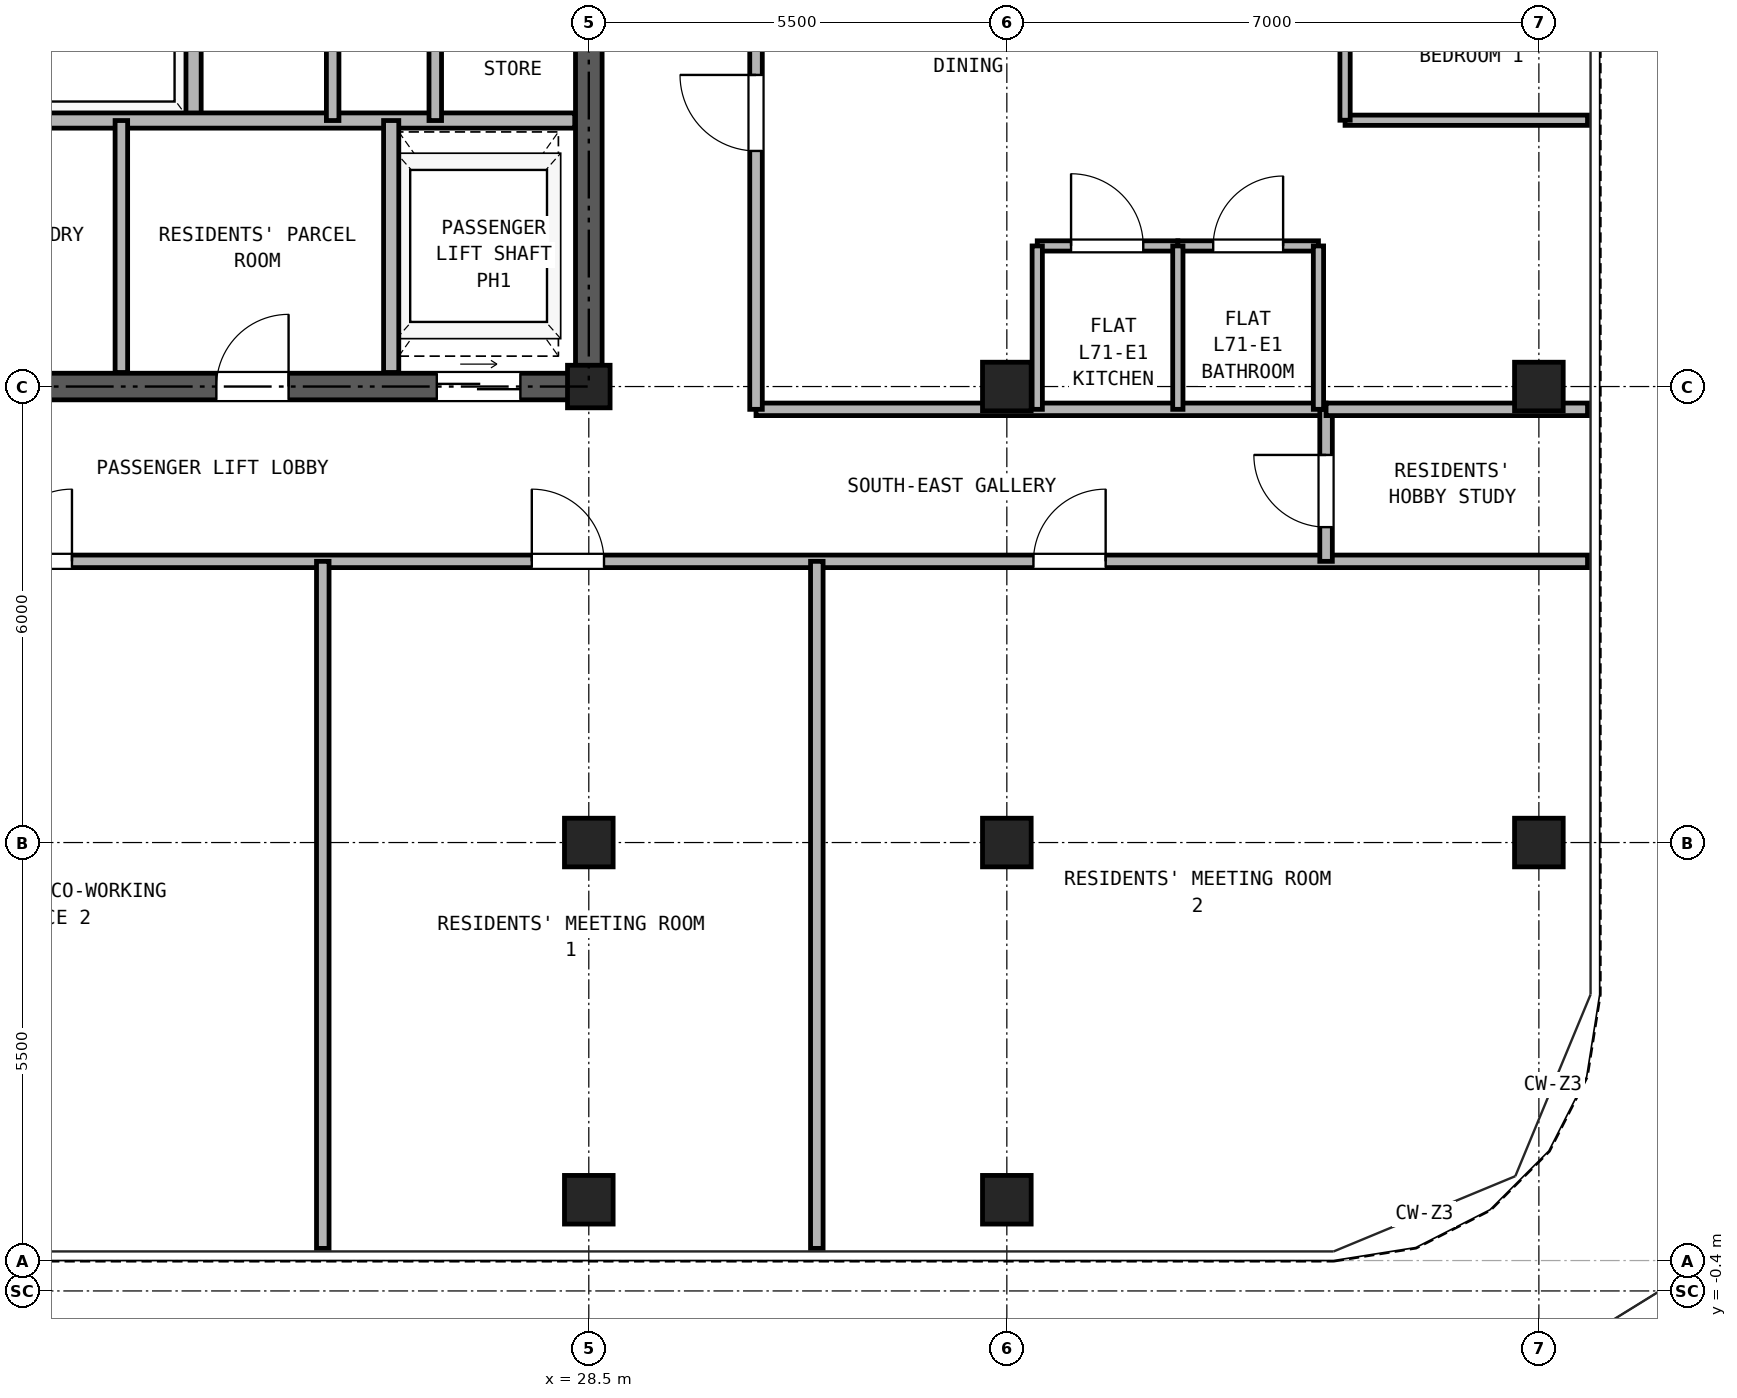
"""IFC4 building model, lengths in metres.
Left out: names, types, materials, properties, quantities, classifications, styles, units other than length and angle.
Written with IfcOpenShell. Run it as: python <this file> out.ifc"""

import sys

from ifc_helpers import new_model, si_unit, direction, frame, frame_2d, origin, origin_2d, place, context, subcontext, project, spatial, rectangle, hollow_rectangle, extrude, source, transform, mapped, element, fill, save


model = new_model("IFC4")
c1 = context("Model", 3, precision=1e-05, world=origin(), true_north=direction((0.0, 1.0)))
c2 = subcontext(c1, "Body", "Model", "MODEL_VIEW")
j1 = project(units=[si_unit("LENGTHUNIT", "METRE"), si_unit("PLANEANGLEUNIT", "RADIAN")], contexts=[c1])
p1 = place(None, origin())
s1 = spatial("IfcSite", under=j1, at=p1, CompositionType="ELEMENT")
p2 = place(p1, origin())
s2 = spatial("IfcBuilding", under=s1, at=p2, CompositionType="ELEMENT")
p3 = place(p2, frame((0.0, 0.0, 248.9)))
s3 = spatial("IfcBuildingStorey", under=s2, at=p3, CompositionType="ELEMENT", Elevation=248.9)
m1 = source(origin(), c2, "Body", "SweptSolid", [
    extrude(hollow_rectangle(XDim=0.64, YDim=0.64, WallThickness=0.035, at=origin_2d()), origin(), (0.0, 0.0, 1.0), 2.98),
])
for number, where, z_axis, x_axis in (
    (1, (28.5, 0.8, 0.0), (0.0, 0.0, 1.0), (1.0, 0.0, 0.0)),
    (2, (34.0, 0.8, 0.0), (0.0, 0.0, 1.0), (1.0, 0.0, 0.0)),
    (3, (41.0, 5.5, 0.0), (0.0, 0.0, 1.0), (1.0, 0.0, 0.0)),
    (4, (41.0, 11.5, 0.0), (0.0, 0.0, 1.0), (1.0, 0.0, 0.0)),
    (5, (28.5, 5.5, 0.0), (0.0, 0.0, 1.0), (1.0, 0.0, 0.0)),
):
    element("IfcColumn", number, at=place(p3, frame(where, z_axis=z_axis, x_axis=x_axis)), inside=s3, PredefinedType="COLUMN", context=c2, shape_type="MappedRepresentation", body=[
        mapped(m1, transform((0.0, 0.0, 0.0), x_axis=(1.0, 0.0, 0.0), y_axis=(0.0, 1.0, 0.0), z_axis=(0.0, 0.0, 1.0), scale=1.0)),
    ])
m2 = source(origin(), c2, "Body", "SweptSolid", [
    extrude(hollow_rectangle(XDim=0.56, YDim=0.56, WallThickness=0.03, at=origin_2d()), origin(), (0.0, 0.0, 1.0), 2.98),
])
p4 = place(p3, frame((28.5, 11.5, 0.0), z_axis=(0.0, 0.0, 1.0), x_axis=(1.0, 0.0, 0.0)))
e6 = element("IfcColumn", 6, at=p4, inside=s3, PredefinedType="COLUMN", context=c2, shape_type="MappedRepresentation", body=[
    mapped(m2, transform((0.0, 0.0, 0.0), x_axis=(1.0, 0.0, 0.0), y_axis=(0.0, 1.0, 0.0), z_axis=(0.0, 0.0, 1.0), scale=1.0)),
])
for number, where, z_axis, x_axis in (
    (7, (34.0, 5.5, 0.0), (0.0, 0.0, 1.0), (1.0, 0.0, 0.0)),
    (8, (34.0, 11.5, 0.0), (0.0, 0.0, 1.0), (1.0, 0.0, 0.0)),
):
    element("IfcColumn", number, at=place(p3, frame(where, z_axis=z_axis, x_axis=x_axis)), inside=s3, PredefinedType="COLUMN", context=c2, shape_type="MappedRepresentation", body=[
        mapped(m1, transform((0.0, 0.0, 0.0), x_axis=(1.0, 0.0, 0.0), y_axis=(0.0, 1.0, 0.0), z_axis=(0.0, 0.0, 1.0), scale=1.0)),
    ])
p5 = place(p3, frame((18.325, 11.5, 0.0), z_axis=(0.0, 0.0, 1.0), x_axis=(1.0, 0.0, 0.0)))
e9 = element("IfcWall", 9, at=p5, inside=s3, PredefinedType="SHEAR", context=c2, shape_type="SweptSolid", body=[
    extrude(rectangle(XDim=10.35, YDim=0.35, at=frame_2d((5.175, 0.0))), origin(), (0.0, 0.0, 1.0), 2.98),
])
p6 = place(p5, frame((1.775, 0.0, 0.0)))
e10 = element("IfcOpeningElement", 10, at=p6, cuts=e9, PredefinedType="OPENING", context=c2, shape_type="SweptSolid", body=[
    extrude(rectangle(XDim=0.95, YDim=2.15, at=frame_2d((0.475, 1.075))), frame((0.0, 0.185, 0.0), z_axis=(0.0, -1.0, 0.0), x_axis=(1.0, 0.0, 0.0)), (0.0, 0.0, 1.0), 0.37),
])
p7 = place(p5, frame((5.275, 0.0, 0.0)))
e11 = element("IfcOpeningElement", 11, at=p7, cuts=e9, PredefinedType="OPENING", context=c2, shape_type="SweptSolid", body=[
    extrude(rectangle(XDim=0.95, YDim=2.15, at=frame_2d((0.475, 1.075))), frame((0.0, 0.185, 0.0), z_axis=(0.0, -1.0, 0.0), x_axis=(1.0, 0.0, 0.0)), (0.0, 0.0, 1.0), 0.37),
])
p8 = place(p5, frame((8.175, 0.0, 0.0)))
e12 = element("IfcOpeningElement", 12, at=p8, cuts=e9, PredefinedType="OPENING", context=c2, shape_type="SweptSolid", body=[
    extrude(rectangle(XDim=1.1, YDim=2.25, at=frame_2d((0.55, 1.125))), frame((0.0, 0.185, 0.0), z_axis=(0.0, -1.0, 0.0), x_axis=(1.0, 0.0, 0.0)), (0.0, 0.0, 1.0), 0.37),
])
p9 = place(p3, frame((28.5, 11.675, 0.0), z_axis=(0.0, 0.0, 1.0), x_axis=(0.0, 1.0, 0.0)))
e13 = element("IfcWall", 13, at=p9, inside=s3, PredefinedType="SHEAR", context=c2, shape_type="SweptSolid", body=[
    extrude(rectangle(XDim=16.9, YDim=0.35, at=frame_2d((8.45, 0.0))), origin(), (0.0, 0.0, 1.0), 2.98),
])
p10 = place(p9, frame((7.475, 0.0, 0.0)))
e14 = element("IfcOpeningElement", 14, at=p10, cuts=e13, PredefinedType="OPENING", context=c2, shape_type="SweptSolid", body=[
    extrude(rectangle(XDim=1.15, YDim=2.2, at=frame_2d((0.575, 1.1))), frame((0.0, 0.185, 0.0), z_axis=(0.0, -1.0, 0.0), x_axis=(1.0, 0.0, 0.0)), (0.0, 0.0, 1.0), 0.37),
])
p11 = place(p3, frame((23.3, 15.0, 0.0), z_axis=(0.0, 0.0, 1.0), x_axis=(0.0, 1.0, 0.0)))
e15 = element("IfcWall", 15, at=p11, inside=s3, PredefinedType="PARTITIONING", context=c2, shape_type="SweptSolid", body=[
    extrude(rectangle(XDim=3.0, YDim=0.2, at=frame_2d((1.5, 0.0))), origin(), (0.0, 0.0, 1.0), 2.98),
])
p12 = place(p3, frame((18.685, 15.0, 0.0), z_axis=(0.0, 0.0, 1.0), x_axis=(1.0, 0.0, 0.0)))
e16 = element("IfcWall", 16, at=p12, inside=s3, PredefinedType="PARTITIONING", context=c2, shape_type="SweptSolid", body=[
    extrude(rectangle(XDim=9.63, YDim=0.2, at=frame_2d((4.815, 0.0))), origin(), (0.0, 0.0, 1.0), 2.98),
])
p13 = place(p3, frame((25.13, 15.0, 0.0), z_axis=(0.0, 0.0, 1.0), x_axis=(0.0, 1.0, 0.0)))
e17 = element("IfcWall", 17, at=p13, inside=s3, PredefinedType="PARTITIONING", context=c2, shape_type="SweptSolid", body=[
    extrude(rectangle(XDim=3.0, YDim=0.165, at=frame_2d((1.5, 0.0))), origin(), (0.0, 0.0, 1.0), 2.98),
])
p14 = place(p3, frame((26.48, 15.0, 0.0), z_axis=(0.0, 0.0, 1.0), x_axis=(0.0, 1.0, 0.0)))
e18 = element("IfcWall", 18, at=p14, inside=s3, PredefinedType="PARTITIONING", context=c2, shape_type="SweptSolid", body=[
    extrude(rectangle(XDim=3.0, YDim=0.165, at=frame_2d((1.5, 0.0))), origin(), (0.0, 0.0, 1.0), 2.98),
])
p15 = place(p14, frame((1.05, 0.0, 0.0)))
e19 = element("IfcOpeningElement", 19, at=p15, cuts=e18, PredefinedType="OPENING", context=c2, shape_type="SweptSolid", body=[
    extrude(rectangle(XDim=0.9, YDim=2.05, at=frame_2d((0.45, 1.025))), frame((0.0, 0.093, 0.0), z_axis=(0.0, -1.0, 0.0), x_axis=(1.0, 0.0, 0.0)), (0.0, 0.0, 1.0), 0.185),
])
p16 = place(p3, frame((22.35, 11.685, 0.0), z_axis=(0.0, 0.0, 1.0), x_axis=(0.0, 1.0, 0.0)))
e20 = element("IfcWall", 20, at=p16, inside=s3, PredefinedType="PARTITIONING", context=c2, shape_type="SweptSolid", body=[
    extrude(rectangle(XDim=3.315, YDim=0.165, at=frame_2d((1.657, 0.0))), origin(), (0.0, 0.0, 1.0), 2.98),
])
p17 = place(p3, frame((25.9, 11.685, 0.0), z_axis=(0.0, 0.0, 1.0), x_axis=(0.0, 1.0, 0.0)))
e21 = element("IfcWall", 21, at=p17, inside=s3, PredefinedType="PARTITIONING", context=c2, shape_type="SweptSolid", body=[
    extrude(rectangle(XDim=3.315, YDim=0.2, at=frame_2d((1.657, 0.0))), origin(), (0.0, 0.0, 1.0), 2.98),
])
p18 = place(p3, frame((5.36, 9.2, 0.0), z_axis=(0.0, 0.0, 1.0), x_axis=(1.0, 0.0, 0.0)))
e22 = element("IfcWall", 22, at=p18, inside=s3, PredefinedType="PARTITIONING", context=c2, shape_type="SweptSolid", body=[
    extrude(rectangle(XDim=36.28, YDim=0.165, at=frame_2d((18.14, 0.0))), origin(), (0.0, 0.0, 1.0), 2.98),
])
p19 = place(p18, frame((7.17, 0.0, 0.0)))
e23 = element("IfcOpeningElement", 23, at=p19, cuts=e22, PredefinedType="OPENING", context=c2, shape_type="SweptSolid", body=[
    extrude(rectangle(XDim=0.95, YDim=2.15, at=frame_2d((0.475, 1.075))), frame((0.0, 0.093, 0.0), z_axis=(0.0, -1.0, 0.0), x_axis=(1.0, 0.0, 0.0)), (0.0, 0.0, 1.0), 0.185),
])
p20 = place(p18, frame((15.39, 0.0, 0.0)))
e24 = element("IfcOpeningElement", 24, at=p20, cuts=e22, PredefinedType="OPENING", context=c2, shape_type="SweptSolid", body=[
    extrude(rectangle(XDim=0.95, YDim=2.15, at=frame_2d((0.475, 1.075))), frame((0.0, 0.093, 0.0), z_axis=(0.0, -1.0, 0.0), x_axis=(1.0, 0.0, 0.0)), (0.0, 0.0, 1.0), 0.185),
])
p21 = place(p18, frame((22.39, 0.0, 0.0)))
e25 = element("IfcOpeningElement", 25, at=p21, cuts=e22, PredefinedType="OPENING", context=c2, shape_type="SweptSolid", body=[
    extrude(rectangle(XDim=0.95, YDim=2.15, at=frame_2d((0.475, 1.075))), frame((0.0, 0.093, 0.0), z_axis=(0.0, -1.0, 0.0), x_axis=(1.0, 0.0, 0.0)), (0.0, 0.0, 1.0), 0.185),
])
p22 = place(p18, frame((28.99, 0.0, 0.0)))
e26 = element("IfcOpeningElement", 26, at=p22, cuts=e22, PredefinedType="OPENING", context=c2, shape_type="SweptSolid", body=[
    extrude(rectangle(XDim=0.95, YDim=2.15, at=frame_2d((0.475, 1.075))), frame((0.0, 0.093, 0.0), z_axis=(0.0, -1.0, 0.0), x_axis=(1.0, 0.0, 0.0)), (0.0, 0.0, 1.0), 0.185),
])
p23 = place(p3, frame((30.7, 11.2, 0.0), z_axis=(0.0, 0.0, 1.0), x_axis=(1.0, 0.0, 0.0)))
e27 = element("IfcWall", 27, at=p23, inside=s3, PredefinedType="PARTITIONING", context=c2, shape_type="SweptSolid", body=[
    extrude(rectangle(XDim=7.5, YDim=0.165, at=frame_2d((3.75, 0.0))), origin(), (0.0, 0.0, 1.0), 2.98),
])
p24 = place(p3, frame((38.2, 9.2, 0.0), z_axis=(0.0, 0.0, 1.0), x_axis=(0.0, 1.0, 0.0)))
e28 = element("IfcWall", 28, at=p24, inside=s3, PredefinedType="PARTITIONING", context=c2, shape_type="SweptSolid", body=[
    extrude(rectangle(XDim=2.0, YDim=0.165, at=frame_2d((1.0, 0.0))), origin(), (0.0, 0.0, 1.0), 2.98),
])
p25 = place(p24, frame((0.45, 0.0, 0.0)))
e29 = element("IfcOpeningElement", 29, at=p25, cuts=e28, PredefinedType="OPENING", context=c2, shape_type="SweptSolid", body=[
    extrude(rectangle(XDim=0.95, YDim=2.15, at=frame_2d((0.475, 1.075))), frame((0.0, 0.093, 0.0), z_axis=(0.0, -1.0, 0.0), x_axis=(1.0, 0.0, 0.0)), (0.0, 0.0, 1.0), 0.185),
])
p26 = place(p3, frame((30.7, 11.2, 0.0), z_axis=(0.0, 0.0, 1.0), x_axis=(0.0, 1.0, 0.0)))
e30 = element("IfcWall", 30, at=p26, inside=s3, PredefinedType="PARTITIONING", context=c2, shape_type="SweptSolid", body=[
    extrude(rectangle(XDim=23.94, YDim=0.165, at=frame_2d((11.97, 0.0))), origin(), (0.0, 0.0, 1.0), 2.98),
])
p27 = place(p26, frame((3.4, 0.0, 0.0)))
e31 = element("IfcOpeningElement", 31, at=p27, cuts=e30, PredefinedType="OPENING", context=c2, shape_type="SweptSolid", body=[
    extrude(rectangle(XDim=1.0, YDim=2.15, at=frame_2d((0.5, 1.075))), frame((0.0, 0.093, 0.0), z_axis=(0.0, -1.0, 0.0), x_axis=(1.0, 0.0, 0.0)), (0.0, 0.0, 1.0), 0.185),
])
p28 = place(p26, frame((11.4, 0.0, 0.0)))
e32 = element("IfcOpeningElement", 32, at=p28, cuts=e30, PredefinedType="OPENING", context=c2, shape_type="SweptSolid", body=[
    extrude(rectangle(XDim=1.0, YDim=2.15, at=frame_2d((0.5, 1.075))), frame((0.0, 0.093, 0.0), z_axis=(0.0, -1.0, 0.0), x_axis=(1.0, 0.0, 0.0)), (0.0, 0.0, 1.0), 0.185),
])
p29 = place(p26, frame((17.05, 0.0, 0.0)))
e33 = element("IfcOpeningElement", 33, at=p29, cuts=e30, PredefinedType="OPENING", context=c2, shape_type="SweptSolid", body=[
    extrude(rectangle(XDim=1.0, YDim=2.15, at=frame_2d((0.5, 1.075))), frame((0.0, 0.093, 0.0), z_axis=(0.0, -1.0, 0.0), x_axis=(1.0, 0.0, 0.0)), (0.0, 0.0, 1.0), 0.185),
])
for number, where, z_axis, x_axis in (
    (34, (25.0, 0.16, 0.0), (0.0, 0.0, 1.0), (0.0, 1.0, 0.0)),
    (35, (31.5, 0.16, 0.0), (0.0, 0.0, 1.0), (0.0, 1.0, 0.0)),
):
    element("IfcWall", number, at=place(p3, frame(where, z_axis=z_axis, x_axis=x_axis)), inside=s3, PredefinedType="PARTITIONING", context=c2, shape_type="SweptSolid", body=[
        extrude(rectangle(XDim=9.04, YDim=0.165, at=frame_2d((4.52, 0.0))), origin(), (0.0, 0.0, 1.0), 2.98),
    ])
p30 = place(p3, frame((38.2, 11.2, 0.0), z_axis=(0.0, 0.0, 1.0), x_axis=(1.0, 0.0, 0.0)))
e36 = element("IfcWall", 36, at=p30, inside=s3, PredefinedType="PARTITIONING", context=c2, shape_type="SweptSolid", body=[
    extrude(rectangle(XDim=3.44, YDim=0.165, at=frame_2d((1.72, 0.0))), origin(), (0.0, 0.0, 1.0), 2.98),
])
p31 = place(p3, frame((34.4, 13.35, 0.0), z_axis=(0.0, 0.0, 1.0), x_axis=(1.0, 0.0, 0.0)))
e37 = element("IfcWall", 37, at=p31, inside=s3, PredefinedType="PARTITIONING", context=c2, shape_type="SweptSolid", body=[
    extrude(rectangle(XDim=1.85, YDim=0.135, at=frame_2d((0.925, 0.0))), origin(), (0.0, 0.0, 1.0), 2.98),
])
p32 = place(p31, frame((0.445, 0.0, 0.0)))
e38 = element("IfcOpeningElement", 38, at=p32, cuts=e37, PredefinedType="OPENING", context=c2, shape_type="SweptSolid", body=[
    extrude(rectangle(XDim=0.95, YDim=2.15, at=frame_2d((0.475, 1.075))), frame((0.0, 0.077, 0.0), z_axis=(0.0, -1.0, 0.0), x_axis=(1.0, 0.0, 0.0)), (0.0, 0.0, 1.0), 0.155),
])
p33 = place(p3, frame((36.25, 13.35, 0.0), z_axis=(0.0, 0.0, 1.0), x_axis=(1.0, 0.0, 0.0)))
e39 = element("IfcWall", 39, at=p33, inside=s3, PredefinedType="PARTITIONING", context=c2, shape_type="SweptSolid", body=[
    extrude(rectangle(XDim=1.85, YDim=0.135, at=frame_2d((0.925, 0.0))), origin(), (0.0, 0.0, 1.0), 2.98),
])
p34 = place(p33, frame((0.465, 0.0, 0.0)))
e40 = element("IfcOpeningElement", 40, at=p34, cuts=e39, PredefinedType="OPENING", context=c2, shape_type="SweptSolid", body=[
    extrude(rectangle(XDim=0.92, YDim=2.1, at=frame_2d((0.46, 1.05))), frame((0.0, 0.077, 0.0), z_axis=(0.0, -1.0, 0.0), x_axis=(1.0, 0.0, 0.0)), (0.0, 0.0, 1.0), 0.155),
])
for number, where, z_axis, x_axis in (
    (41, (34.4, 11.2, 0.0), (0.0, 0.0, 1.0), (0.0, 1.0, 0.0)),
    (42, (36.25, 11.2, 0.0), (0.0, 0.0, 1.0), (0.0, 1.0, 0.0)),
    (43, (38.1, 11.2, 0.0), (0.0, 0.0, 1.0), (0.0, 1.0, 0.0)),
):
    element("IfcWall", number, at=place(p3, frame(where, z_axis=z_axis, x_axis=x_axis)), inside=s3, PredefinedType="PARTITIONING", context=c2, shape_type="SweptSolid", body=[
        extrude(rectangle(XDim=2.15, YDim=0.135, at=frame_2d((1.075, 0.0))), origin(), (0.0, 0.0, 1.0), 2.98),
    ])
p35 = place(p3, frame((38.45, 15.004, 0.0), z_axis=(0.0, 0.0, 1.0), x_axis=(1.0, 0.0, 0.0)))
e44 = element("IfcWall", 44, at=p35, inside=s3, PredefinedType="PARTITIONING", context=c2, shape_type="SweptSolid", body=[
    extrude(rectangle(XDim=3.19, YDim=0.135, at=frame_2d((1.595, 0.0))), origin(), (0.0, 0.0, 1.0), 2.98),
])
p36 = place(p3, frame((38.45, 15.004, 0.0), z_axis=(0.0, 0.0, 1.0), x_axis=(0.0, 1.0, 0.0)))
e45 = element("IfcWall", 45, at=p36, inside=s3, PredefinedType="PARTITIONING", context=c2, shape_type="SweptSolid", body=[
    extrude(rectangle(XDim=3.996, YDim=0.135, at=frame_2d((1.998, 0.0))), origin(), (0.0, 0.0, 1.0), 2.98),
])
p37 = place(p36, frame((1.518, 0.0, 0.0)))
e46 = element("IfcOpeningElement", 46, at=p37, cuts=e45, PredefinedType="OPENING", context=c2, shape_type="SweptSolid", body=[
    extrude(rectangle(XDim=0.95, YDim=2.15, at=frame_2d((0.475, 1.075))), frame((0.0, 0.077, 0.0), z_axis=(0.0, -1.0, 0.0), x_axis=(1.0, 0.0, 0.0)), (0.0, 0.0, 1.0), 0.155),
])
p38 = place(p7, frame((0.95, 0.0, 0.0), z_axis=(0.0, 0.0, 1.0), x_axis=(-1.0, 0.0, 0.0)))
e47 = element("IfcDoor", 47, at=p38, inside=s3, OperationType="SINGLE_SWING_RIGHT", PredefinedType="DOOR", context=c2, shape_type="SweptSolid", body=[
    extrude(rectangle(XDim=0.95, YDim=2.15, at=frame_2d((0.475, 1.075))), frame((0.0, 0.025, 0.0), z_axis=(0.0, -1.0, 0.0), x_axis=(1.0, 0.0, 0.0)), (0.0, 0.0, 1.0), 0.05),
])
fill(e11, e47)
p39 = place(p8, frame((1.1, 0.0, 0.0), z_axis=(0.0, 0.0, 1.0), x_axis=(-1.0, 0.0, 0.0)))
e48 = element("IfcDoor", 48, at=p39, inside=s3, OperationType="DOUBLE_DOOR_SLIDING", PredefinedType="DOOR", context=c2, shape_type="SweptSolid", body=[
    extrude(rectangle(XDim=1.1, YDim=2.25, at=frame_2d((0.55, 1.125))), frame((0.0, 0.025, 0.0), z_axis=(0.0, -1.0, 0.0), x_axis=(1.0, 0.0, 0.0)), (0.0, 0.0, 1.0), 0.05),
])
fill(e12, e48)
p40 = place(p20, frame((0.95, 0.0, 0.0), z_axis=(0.0, 0.0, 1.0), x_axis=(-1.0, 0.0, 0.0)))
e49 = element("IfcDoor", 49, at=p40, inside=s3, OperationType="SINGLE_SWING_RIGHT", PredefinedType="DOOR", context=c2, shape_type="SweptSolid", body=[
    extrude(rectangle(XDim=0.95, YDim=2.15, at=frame_2d((0.475, 1.075))), frame((0.0, 0.025, 0.0), z_axis=(0.0, -1.0, 0.0), x_axis=(1.0, 0.0, 0.0)), (0.0, 0.0, 1.0), 0.05),
])
fill(e24, e49)
p41 = place(p21, frame((0.95, 0.0, 0.0), z_axis=(0.0, 0.0, 1.0), x_axis=(-1.0, 0.0, 0.0)))
e50 = element("IfcDoor", 50, at=p41, inside=s3, OperationType="SINGLE_SWING_LEFT", PredefinedType="DOOR", context=c2, shape_type="SweptSolid", body=[
    extrude(rectangle(XDim=0.95, YDim=2.15, at=frame_2d((0.475, 1.075))), frame((0.0, 0.025, 0.0), z_axis=(0.0, -1.0, 0.0), x_axis=(1.0, 0.0, 0.0)), (0.0, 0.0, 1.0), 0.05),
])
fill(e25, e50)
p42 = place(p22, frame((0.95, 0.0, 0.0), z_axis=(0.0, 0.0, 1.0), x_axis=(-1.0, 0.0, 0.0)))
e51 = element("IfcDoor", 51, at=p42, inside=s3, OperationType="SINGLE_SWING_RIGHT", PredefinedType="DOOR", context=c2, shape_type="SweptSolid", body=[
    extrude(rectangle(XDim=0.95, YDim=2.15, at=frame_2d((0.475, 1.075))), frame((0.0, 0.025, 0.0), z_axis=(0.0, -1.0, 0.0), x_axis=(1.0, 0.0, 0.0)), (0.0, 0.0, 1.0), 0.05),
])
fill(e26, e51)
p43 = place(p25, origin())
e52 = element("IfcDoor", 52, at=p43, inside=s3, OperationType="SINGLE_SWING_RIGHT", PredefinedType="DOOR", context=c2, shape_type="SweptSolid", body=[
    extrude(rectangle(XDim=0.95, YDim=2.15, at=frame_2d((0.475, 1.075))), frame((0.0, 0.025, 0.0), z_axis=(0.0, -1.0, 0.0), x_axis=(1.0, 0.0, 0.0)), (0.0, 0.0, 1.0), 0.05),
])
fill(e29, e52)
p44 = place(p32, origin())
e53 = element("IfcDoor", 53, at=p44, inside=s3, OperationType="SINGLE_SWING_LEFT", PredefinedType="DOOR", context=c2, shape_type="SweptSolid", body=[
    extrude(rectangle(XDim=0.95, YDim=2.15, at=frame_2d((0.475, 1.075))), frame((0.0, 0.025, 0.0), z_axis=(0.0, -1.0, 0.0), x_axis=(1.0, 0.0, 0.0)), (0.0, 0.0, 1.0), 0.05),
])
fill(e38, e53)
p45 = place(p34, origin())
e54 = element("IfcDoor", 54, at=p45, inside=s3, OperationType="SINGLE_SWING_RIGHT", PredefinedType="DOOR", context=c2, shape_type="SweptSolid", body=[
    extrude(rectangle(XDim=0.92, YDim=2.1, at=frame_2d((0.46, 1.05))), frame((0.0, 0.025, 0.0), z_axis=(0.0, -1.0, 0.0), x_axis=(1.0, 0.0, 0.0)), (0.0, 0.0, 1.0), 0.05),
])
fill(e40, e54)
p46 = place(p27, frame((1.0, 0.0, 0.0), z_axis=(0.0, 0.0, 1.0), x_axis=(-1.0, 0.0, 0.0)))
e55 = element("IfcDoor", 55, at=p46, inside=s3, OperationType="SINGLE_SWING_RIGHT", PredefinedType="DOOR", context=c2, shape_type="SweptSolid", body=[
    extrude(rectangle(XDim=1.0, YDim=2.15, at=frame_2d((0.5, 1.075))), frame((0.0, 0.025, 0.0), z_axis=(0.0, -1.0, 0.0), x_axis=(1.0, 0.0, 0.0)), (0.0, 0.0, 1.0), 0.05),
])
fill(e31, e55)
save(model, sys.argv[1])
